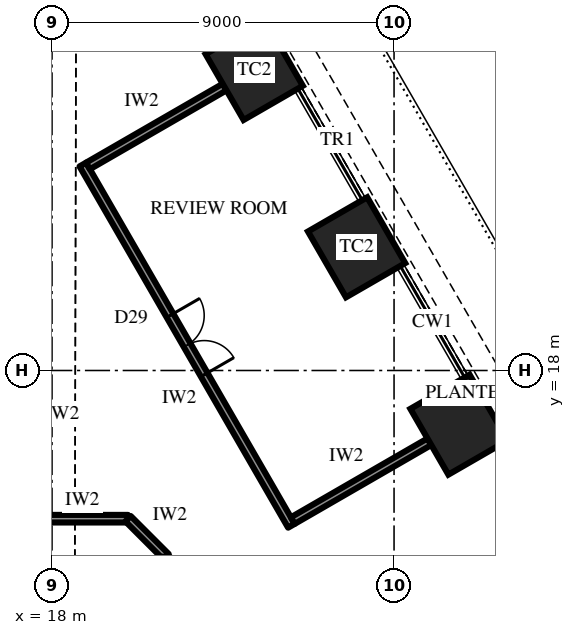
"""IFC4 building model, lengths in metres.
Left out: names, types, materials, properties, quantities, classifications, styles, units other than length and angle.
Written with IfcOpenShell. Run it as: python <this file> out.ifc"""

import sys

from ifc_helpers import new_model, si_unit, direction, frame, frame_2d, origin, origin_2d, place, context, subcontext, project, spatial, rectangle, extrude, element, fill, save


model = new_model("IFC4")
c1 = context("Model", 3, precision=1e-05, world=origin(), true_north=direction((0.0, 1.0)))
c2 = subcontext(c1, "Body", "Model", "MODEL_VIEW")
j1 = project(units=[si_unit("LENGTHUNIT", "METRE"), si_unit("PLANEANGLEUNIT", "RADIAN")], contexts=[c1])
p1 = place(None, origin())
s1 = spatial("IfcSite", under=j1, at=p1, CompositionType="ELEMENT")
p2 = place(p1, origin())
s2 = spatial("IfcBuilding", under=s1, at=p2, CompositionType="ELEMENT")
p3 = place(p2, frame((0.0, 0.0, 52.9)))
s3 = spatial("IfcBuildingStorey", under=s2, at=p3, CompositionType="ELEMENT", Elevation=52.9)
for number, where, z_axis, x_axis in (
    (1, (28.709, 16.575, 0.0), (0.0, 0.0, 1.0), (-0.5, 0.866, 0.0)),
    (2, (26.014, 21.242, 0.0), (0.0, 0.0, 1.0), (-0.5, 0.866, 0.0)),
    (3, (23.32, 25.908, 0.0), (0.0, 0.0, 1.0), (-0.5, 0.866, 0.0)),
):
    element("IfcColumn", number, at=place(p3, frame(where, z_axis=z_axis, x_axis=x_axis)), inside=s3, PredefinedType="COLUMN", context=c2, shape_type="SweptSolid", body=[
        extrude(rectangle(XDim=2.0, YDim=1.8, at=origin_2d()), origin(), (0.0, 0.0, 1.0), 4.2),
    ])
p4 = place(p3, frame((24.299, 13.913, 0.0), z_axis=(0.0, 0.0, 1.0), x_axis=(-0.500009305389, 0.866020031249, 0.0)))
e4 = element("IfcWall", 4, at=p4, inside=s3, PredefinedType="PARTITIONING", context=c2, shape_type="SweptSolid", body=[
    extrude(rectangle(XDim=10.977, YDim=0.2, at=frame_2d((5.489, 0.0))), origin(), (0.0, 0.0, 1.0), 4.0),
])
p5 = place(p4, frame((4.589, 0.0, 0.0)))
e5 = element("IfcOpeningElement", 5, at=p5, cuts=e4, PredefinedType="OPENING", context=c2, shape_type="SweptSolid", body=[
    extrude(rectangle(XDim=1.8, YDim=2.4, at=frame_2d((0.9, 1.2))), frame((0.0, 0.11, 0.0), z_axis=(0.0, -1.0, 0.0), x_axis=(1.0, 0.0, 0.0)), (0.0, 0.0, 1.0), 0.22),
])
p6 = place(p3, frame((24.335, 14.05, 0.0), z_axis=(0.0, 0.0, 1.0), x_axis=(0.86602981871, 0.499992353047, 0.0)))
e6 = element("IfcWall", 6, at=p6, inside=s3, PredefinedType="PARTITIONING", context=c2, shape_type="SweptSolid", body=[
    extrude(rectangle(XDim=4.15, YDim=0.2, at=frame_2d((2.075, 0.0))), origin(), (0.0, 0.0, 1.0), 4.0),
])
p7 = place(p3, frame((18.947, 23.383, 0.0), z_axis=(0.0, 0.0, 1.0), x_axis=(0.86602981871, 0.499992353047, 0.0)))
e7 = element("IfcWall", 7, at=p7, inside=s3, PredefinedType="PARTITIONING", context=c2, shape_type="SweptSolid", body=[
    extrude(rectangle(XDim=4.15, YDim=0.2, at=frame_2d((2.075, 0.0))), origin(), (0.0, 0.0, 1.0), 2.992),
])
p8 = place(p3, frame((17.6, 14.1, 0.0), z_axis=(0.0, 0.0, 1.0), x_axis=(1.0, 0.0, 0.0)))
e8 = element("IfcWall", 8, at=p8, inside=s3, PredefinedType="PARTITIONING", context=c2, shape_type="SweptSolid", body=[
    extrude(rectangle(XDim=2.4, YDim=0.2, at=frame_2d((1.2, 0.0))), origin(), (0.0, 0.0, 1.0), 4.0),
])
p9 = place(p3, frame((20.0, 14.1, 0.0), z_axis=(0.0, 0.0, 1.0), x_axis=(0.707106781187, -0.707106781187, 0.0)))
e9 = element("IfcWall", 9, at=p9, inside=s3, PredefinedType="PARTITIONING", context=c2, shape_type="SweptSolid", body=[
    extrude(rectangle(XDim=1.414, YDim=0.2, at=frame_2d((0.707, 0.0))), origin(), (0.0, 0.0, 1.0), 4.0),
])
p10 = place(p5, frame((1.8, 0.0, 0.0), z_axis=(0.0, 0.0, 1.0), x_axis=(-1.0, 0.0, 0.0)))
e10 = element("IfcDoor", 10, at=p10, inside=s3, OperationType="DOUBLE_DOOR_SINGLE_SWING", PredefinedType="DOOR", context=c2, shape_type="SweptSolid", body=[
    extrude(rectangle(XDim=1.8, YDim=2.4, at=frame_2d((0.9, 1.2))), frame((0.0, 0.025, 0.0), z_axis=(0.0, -1.0, 0.0), x_axis=(1.0, 0.0, 0.0)), (0.0, 0.0, 1.0), 0.05),
])
fill(e5, e10)
save(model, sys.argv[1])
